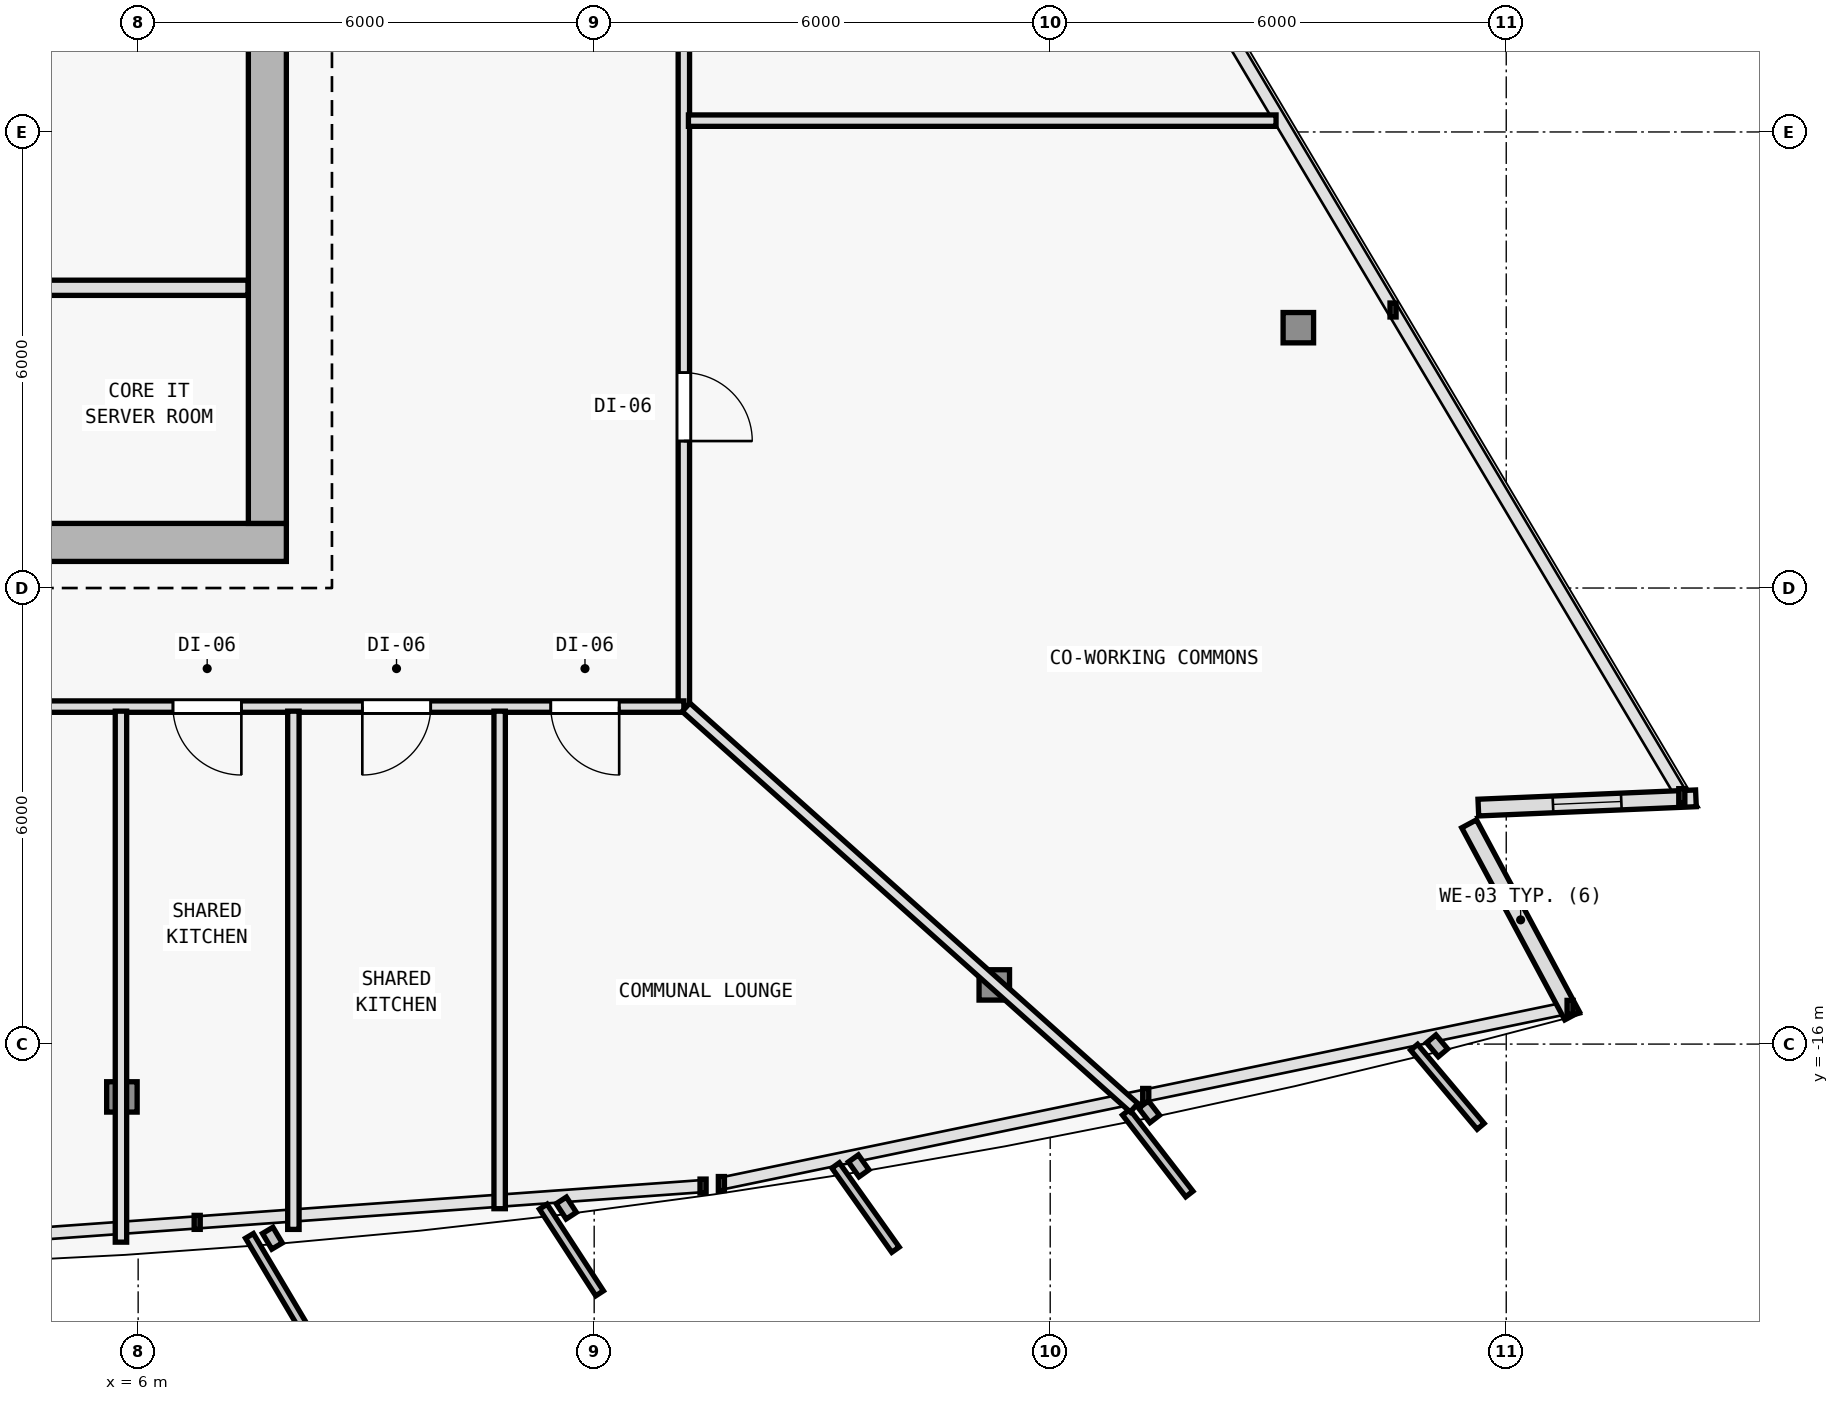
"""IFC4 building model, lengths in metres.
Left out: names, types, materials, properties, quantities, classifications, styles, units other than length and angle.
Written with IfcOpenShell. Run it as: python <this file> out.ifc"""

import sys

from ifc_helpers import new_model, si_unit, direction, frame, frame_2d, origin, origin_2d, place, context, subcontext, project, spatial, rectangle, i_section, extrude, element, fill, save


model = new_model("IFC4")
c1 = context("Model", 3, precision=1e-05, world=origin(), true_north=direction((0.0, 1.0)))
c2 = subcontext(c1, "Body", "Model", "MODEL_VIEW")
j1 = project(units=[si_unit("LENGTHUNIT", "METRE"), si_unit("PLANEANGLEUNIT", "RADIAN")], contexts=[c1])
p1 = place(None, origin())
s1 = spatial("IfcSite", under=j1, at=p1, CompositionType="ELEMENT")
p2 = place(p1, origin())
s2 = spatial("IfcBuilding", under=s1, at=p2, CompositionType="ELEMENT")
p3 = place(p2, frame((0.0, 0.0, 181.8)))
s3 = spatial("IfcBuildingStorey", under=s2, at=p3, CompositionType="ELEMENT", Elevation=181.8)
p4 = place(p3, frame((7.7, -9.4, 0.0), z_axis=(0.0, 0.0, 1.0), x_axis=(1.0, 0.0, 0.0)))
e1 = element("IfcColumn", 1, at=p4, inside=s3, PredefinedType="COLUMN", context=c2, shape_type="SweptSolid", body=[
    extrude(i_section(OverallWidth=0.404, OverallDepth=0.407, WebThickness=0.017, FlangeThickness=0.028, FilletRadius=0.015, at=origin_2d()), origin(), (0.0, 0.0, 1.0), 3.6),
])
p5 = place(p3, frame((5.786, -16.695, 0.005), z_axis=(-0.006865841702, 0.035280909339, 0.999353850072), x_axis=(-0.981585848295, -0.191021523464, 0.0)))
e2 = element("IfcColumn", 2, at=p5, inside=s3, PredefinedType="COLUMN", context=c2, shape_type="SweptSolid", body=[
    extrude(i_section(OverallWidth=0.401, OverallDepth=0.399, WebThickness=0.016, FlangeThickness=0.025, FilletRadius=0.015, at=origin_2d()), origin(), (0.0, 0.0, 1.0), 3.592),
])
p6 = place(p3, frame((17.264, -15.221, 0.005), z_axis=(-0.020662834962, 0.033509136961, 0.999224792022), x_axis=(-0.851183725565, -0.524867855115, 0.0)))
e3 = element("IfcColumn", 3, at=p6, inside=s3, PredefinedType="COLUMN", context=c2, shape_type="SweptSolid", body=[
    extrude(i_section(OverallWidth=0.401, OverallDepth=0.399, WebThickness=0.016, FlangeThickness=0.025, FilletRadius=0.015, at=origin_2d()), origin(), (0.0, 0.0, 1.0), 3.592),
])
p7 = place(p3, frame((21.265, -6.575, 0.005), z_axis=(-0.026105663043, 0.021618752208, 0.999425396871), x_axis=(-0.637813971185, -0.770190455771, 0.0)))
e4 = element("IfcColumn", 4, at=p7, inside=s3, PredefinedType="COLUMN", context=c2, shape_type="SweptSolid", body=[
    extrude(i_section(OverallWidth=0.401, OverallDepth=0.399, WebThickness=0.016, FlangeThickness=0.025, FilletRadius=0.015, at=origin_2d()), origin(), (0.0, 0.0, 1.0), 3.591),
])
p8 = place(p3, frame((23.511, -13.102, 0.0), z_axis=(0.0, 0.0, 1.0), x_axis=(0.472804807667, -0.881167188362, 0.0)))
e5 = element("IfcWall", 5, at=p8, inside=s3, PredefinedType="SOLIDWALL", context=c2, shape_type="SweptSolid", body=[
    extrude(rectangle(XDim=2.868, YDim=0.22, at=frame_2d((1.434, 0.0))), origin(), (0.0, 0.0, 1.0), 3.28),
])
p9 = place(p3, frame((26.496, -12.767, 0.0), z_axis=(0.0, 0.0, 1.0), x_axis=(-0.999095763679, -0.042516526188, 0.0)))
e6 = element("IfcWall", 6, at=p9, inside=s3, PredefinedType="SOLIDWALL", context=c2, shape_type="SweptSolid", body=[
    extrude(rectangle(XDim=2.865, YDim=0.22, at=frame_2d((1.433, 0.0))), origin(), (0.0, 0.0, 1.0), 3.28),
])
p10 = place(p9, frame((0.983, 0.0, 0.62)))
e7 = element("IfcOpeningElement", 7, at=p10, cuts=e6, PredefinedType="OPENING", context=c2, shape_type="SweptSolid", body=[
    extrude(rectangle(XDim=0.9, YDim=1.6, at=frame_2d((0.45, 0.8))), frame((0.0, 0.12, 0.0), z_axis=(0.0, -1.0, 0.0), x_axis=(1.0, 0.0, 0.0)), (0.0, 0.0, 1.0), 0.24),
])
p11 = place(p3, frame((-7.95, -9.4, 0.0), z_axis=(0.0, 0.0, 1.0), x_axis=(1.0, 0.0, 0.0)))
e8 = element("IfcWall", 8, at=p11, inside=s3, PredefinedType="SHEAR", context=c2, shape_type="SweptSolid", body=[
    extrude(rectangle(XDim=15.9, YDim=0.5, at=frame_2d((7.95, 0.0))), origin(), (0.0, 0.0, 1.0), 3.28),
])
p12 = place(p11, frame((9.6, 0.0, 0.0)))
e9 = element("IfcOpeningElement", 9, at=p12, cuts=e8, PredefinedType="OPENING", context=c2, shape_type="SweptSolid", body=[
    extrude(rectangle(XDim=1.5, YDim=2.2, at=frame_2d((0.75, 1.1))), frame((0.0, 0.26, 0.0), z_axis=(0.0, -1.0, 0.0), x_axis=(1.0, 0.0, 0.0)), (0.0, 0.0, 1.0), 0.52),
])
p13 = place(p3, frame((7.7, 9.95, 0.0), z_axis=(0.0, 0.0, 1.0), x_axis=(0.0, -1.0, 0.0)))
e10 = element("IfcWall", 10, at=p13, inside=s3, PredefinedType="SHEAR", context=c2, shape_type="SweptSolid", body=[
    extrude(rectangle(XDim=19.1, YDim=0.5, at=frame_2d((9.55, 0.0))), origin(), (0.0, 0.0, 1.0), 3.28),
])
p14 = place(p3, frame((4.15, -6.05, 0.0), z_axis=(0.0, 0.0, 1.0), x_axis=(1.0, 0.0, 0.0)))
e11 = element("IfcWall", 11, at=p14, inside=s3, PredefinedType="SOLIDWALL", context=c2, shape_type="SweptSolid", body=[
    extrude(rectangle(XDim=3.295, YDim=0.2, at=frame_2d((1.647, 0.0))), origin(), (0.0, 0.0, 1.0), 3.28),
])
p15 = place(p3, frame((13.18, 8.444, 0.0), z_axis=(0.0, 0.0, 1.0), x_axis=(0.0, -1.0, 0.0)))
e12 = element("IfcWall", 12, at=p15, inside=s3, PredefinedType="PARTITIONING", context=c2, shape_type="SweptSolid", body=[
    extrude(rectangle(XDim=20.004, YDim=0.15, at=frame_2d((10.002, 0.0))), origin(), (0.0, 0.0, 1.0), 2.655),
])
p16 = place(p15, frame((15.61, 0.0, 0.0)))
e13 = element("IfcOpeningElement", 13, at=p16, cuts=e12, PredefinedType="OPENING", context=c2, shape_type="SweptSolid", body=[
    extrude(rectangle(XDim=0.9, YDim=2.1, at=frame_2d((0.45, 1.05))), frame((0.0, 0.085, 0.0), z_axis=(0.0, -1.0, 0.0), x_axis=(1.0, 0.0, 0.0)), (0.0, 0.0, 1.0), 0.17),
])
p17 = place(p15, frame((8.088, 0.0, 0.0)))
e14 = element("IfcOpeningElement", 14, at=p17, cuts=e12, PredefinedType="OPENING", context=c2, shape_type="SweptSolid", body=[
    extrude(rectangle(XDim=0.9, YDim=2.1, at=frame_2d((0.45, 1.05))), frame((0.0, 0.085, 0.0), z_axis=(0.0, -1.0, 0.0), x_axis=(1.0, 0.0, 0.0)), (0.0, 0.0, 1.0), 0.17),
])
p18 = place(p15, frame((2.03, 0.0, 0.0)))
e15 = element("IfcOpeningElement", 15, at=p18, cuts=e12, PredefinedType="OPENING", context=c2, shape_type="SweptSolid", body=[
    extrude(rectangle(XDim=0.9, YDim=2.1, at=frame_2d((0.45, 1.05))), frame((0.0, 0.085, 0.0), z_axis=(0.0, -1.0, 0.0), x_axis=(1.0, 0.0, 0.0)), (0.0, 0.0, 1.0), 0.17),
])
p19 = place(p3, frame((13.18, -11.56, 0.0), z_axis=(0.0, 0.0, 1.0), x_axis=(-1.0, 0.0, 0.0)))
e16 = element("IfcWall", 16, at=p19, inside=s3, PredefinedType="PARTITIONING", context=c2, shape_type="SweptSolid", body=[
    extrude(rectangle(XDim=23.04, YDim=0.15, at=frame_2d((11.52, 0.0))), origin(), (0.0, 0.0, 1.0), 2.755),
])
p20 = place(p19, frame((14.684, 0.0, 0.0)))
e17 = element("IfcOpeningElement", 17, at=p20, cuts=e16, PredefinedType="OPENING", context=c2, shape_type="SweptSolid", body=[
    extrude(rectangle(XDim=0.9, YDim=2.1, at=frame_2d((0.45, 1.05))), frame((0.0, 0.085, 0.0), z_axis=(0.0, -1.0, 0.0), x_axis=(1.0, 0.0, 0.0)), (0.0, 0.0, 1.0), 0.17),
])
p21 = place(p19, frame((5.822, 0.0, 0.0)))
e18 = element("IfcOpeningElement", 18, at=p21, cuts=e16, PredefinedType="OPENING", context=c2, shape_type="SweptSolid", body=[
    extrude(rectangle(XDim=0.9, YDim=2.1, at=frame_2d((0.45, 1.05))), frame((0.0, 0.085, 0.0), z_axis=(0.0, -1.0, 0.0), x_axis=(1.0, 0.0, 0.0)), (0.0, 0.0, 1.0), 0.17),
])
p22 = place(p19, frame((3.331, 0.0, 0.0)))
e19 = element("IfcOpeningElement", 19, at=p22, cuts=e16, PredefinedType="OPENING", context=c2, shape_type="SweptSolid", body=[
    extrude(rectangle(XDim=0.9, YDim=2.1, at=frame_2d((0.45, 1.05))), frame((0.0, 0.085, 0.0), z_axis=(0.0, -1.0, 0.0), x_axis=(1.0, 0.0, 0.0)), (0.0, 0.0, 1.0), 0.17),
])
p23 = place(p19, frame((0.851, 0.0, 0.0)))
e20 = element("IfcOpeningElement", 20, at=p23, cuts=e16, PredefinedType="OPENING", context=c2, shape_type="SweptSolid", body=[
    extrude(rectangle(XDim=0.9, YDim=2.1, at=frame_2d((0.45, 1.05))), frame((0.0, 0.085, 0.0), z_axis=(0.0, -1.0, 0.0), x_axis=(1.0, 0.0, 0.0)), (0.0, 0.0, 1.0), 0.17),
])
p24 = place(p3, frame((5.774, -11.62, 0.0), z_axis=(0.0, 0.0, 1.0), x_axis=(0.0, -1.0, 0.0)))
e21 = element("IfcWall", 21, at=p24, inside=s3, PredefinedType="PARTITIONING", context=c2, shape_type="SweptSolid", body=[
    extrude(rectangle(XDim=6.986, YDim=0.15, at=frame_2d((3.493, 0.0))), origin(), (0.0, 0.0, 1.0), 2.865),
])
p25 = place(p3, frame((13.208, -11.569, 0.0), z_axis=(0.0, 0.0, 1.0), x_axis=(0.745585259338, -0.666410249815, 0.0)))
e22 = element("IfcWall", 22, at=p25, inside=s3, PredefinedType="PARTITIONING", context=c2, shape_type="SweptSolid", body=[
    extrude(rectangle(XDim=7.906, YDim=0.15, at=frame_2d((3.953, 0.0))), origin(), (0.0, 0.0, 1.0), 2.755),
])
p26 = place(p3, frame((10.756, -11.62, 0.0), z_axis=(0.0, 0.0, 1.0), x_axis=(0.0, -1.0, 0.0)))
e23 = element("IfcWall", 23, at=p26, inside=s3, PredefinedType="PARTITIONING", context=c2, shape_type="SweptSolid", body=[
    extrude(rectangle(XDim=6.545, YDim=0.15, at=frame_2d((3.273, 0.0))), origin(), (0.0, 0.0, 1.0), 2.865),
])
p27 = place(p3, frame((8.042, -11.62, 0.0), z_axis=(0.0, 0.0, 1.0), x_axis=(0.0, -1.0, 0.0)))
e24 = element("IfcWall", 24, at=p27, inside=s3, PredefinedType="PARTITIONING", context=c2, shape_type="SweptSolid", body=[
    extrude(rectangle(XDim=6.818, YDim=0.15, at=frame_2d((3.409, 0.0))), origin(), (0.0, 0.0, 1.0), 2.865),
])
p28 = place(p3, frame((13.24, -3.851, 0.0), z_axis=(0.0, 0.0, 1.0), x_axis=(1.0, 0.0, 0.0)))
e25 = element("IfcWall", 25, at=p28, inside=s3, PredefinedType="PARTITIONING", context=c2, shape_type="SweptSolid", body=[
    extrude(rectangle(XDim=7.731, YDim=0.15, at=frame_2d((3.866, 0.0))), origin(), (0.0, 0.0, 1.0), 2.655),
])
p29 = place(p10, origin())
e26 = element("IfcWindow", 26, at=p29, inside=s3, PartitioningType="SINGLE_PANEL", PredefinedType="WINDOW", context=c2, shape_type="SweptSolid", body=[
    extrude(rectangle(XDim=0.9, YDim=1.6, at=frame_2d((0.45, 0.8))), frame((0.0, 0.03, 0.0), z_axis=(0.0, -1.0, 0.0), x_axis=(1.0, 0.0, 0.0)), (0.0, 0.0, 1.0), 0.06),
])
fill(e7, e26)
p30 = place(p21, origin())
e27 = element("IfcDoor", 27, at=p30, inside=s3, OperationType="SINGLE_SWING_LEFT", PredefinedType="DOOR", context=c2, shape_type="SweptSolid", body=[
    extrude(rectangle(XDim=0.9, YDim=2.1, at=frame_2d((0.45, 1.05))), frame((0.0, 0.025, 0.0), z_axis=(0.0, -1.0, 0.0), x_axis=(1.0, 0.0, 0.0)), (0.0, 0.0, 1.0), 0.05),
])
fill(e18, e27)
p31 = place(p22, origin())
e28 = element("IfcDoor", 28, at=p31, inside=s3, OperationType="SINGLE_SWING_RIGHT", PredefinedType="DOOR", context=c2, shape_type="SweptSolid", body=[
    extrude(rectangle(XDim=0.9, YDim=2.1, at=frame_2d((0.45, 1.05))), frame((0.0, 0.025, 0.0), z_axis=(0.0, -1.0, 0.0), x_axis=(1.0, 0.0, 0.0)), (0.0, 0.0, 1.0), 0.05),
])
fill(e19, e28)
p32 = place(p23, origin())
e29 = element("IfcDoor", 29, at=p32, inside=s3, OperationType="SINGLE_SWING_LEFT", PredefinedType="DOOR", context=c2, shape_type="SweptSolid", body=[
    extrude(rectangle(XDim=0.9, YDim=2.1, at=frame_2d((0.45, 1.05))), frame((0.0, 0.025, 0.0), z_axis=(0.0, -1.0, 0.0), x_axis=(1.0, 0.0, 0.0)), (0.0, 0.0, 1.0), 0.05),
])
fill(e20, e29)
p33 = place(p16, origin())
e30 = element("IfcDoor", 30, at=p33, inside=s3, OperationType="SINGLE_SWING_RIGHT", PredefinedType="DOOR", context=c2, shape_type="SweptSolid", body=[
    extrude(rectangle(XDim=0.9, YDim=2.1, at=frame_2d((0.45, 1.05))), frame((0.0, 0.025, 0.0), z_axis=(0.0, -1.0, 0.0), x_axis=(1.0, 0.0, 0.0)), (0.0, 0.0, 1.0), 0.05),
])
fill(e13, e30)
save(model, sys.argv[1])
